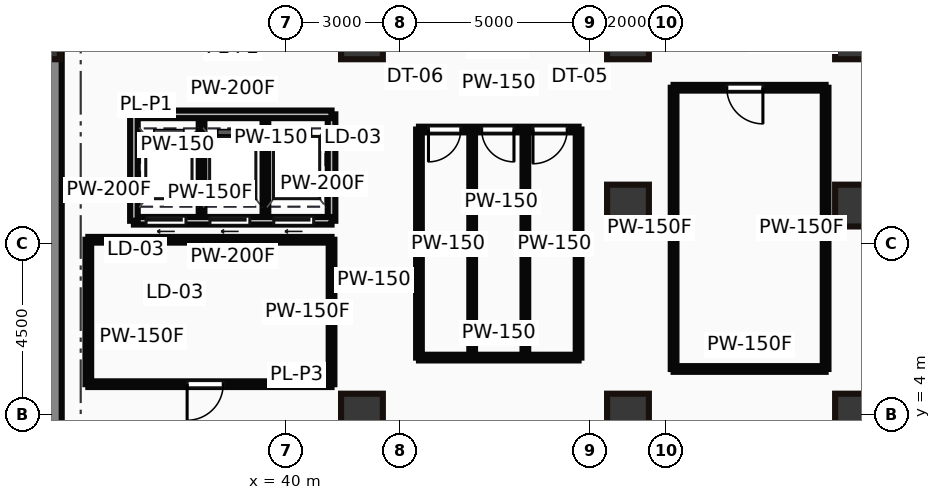
"""IFC4 building model, lengths in metres.
Left out: names, types, materials, properties, quantities, classifications, styles, units other than length and angle.
Written with IfcOpenShell. Run it as: python <this file> out.ifc"""

import sys

from ifc_helpers import new_model, si_unit, direction, frame, frame_2d, origin, origin_2d, place, context, subcontext, project, spatial, rectangle, hollow_rectangle, extrude, source, transform, mapped, element, fill, save


model = new_model("IFC4")
c1 = context("Model", 3, precision=1e-05, world=origin(), true_north=direction((0.0, 1.0)))
c2 = subcontext(c1, "Body", "Model", "MODEL_VIEW")
j1 = project(units=[si_unit("LENGTHUNIT", "METRE"), si_unit("PLANEANGLEUNIT", "RADIAN")], contexts=[c1])
p1 = place(None, origin())
s1 = spatial("IfcSite", under=j1, at=p1, CompositionType="ELEMENT")
p2 = place(p1, origin())
s2 = spatial("IfcBuilding", under=s1, at=p2, CompositionType="ELEMENT")
p3 = place(p2, origin())
s3 = spatial("IfcBuildingStorey", under=s2, at=p3, CompositionType="ELEMENT", Elevation=0.0)
m1 = source(origin(), c2, "Body", "SweptSolid", [
    extrude(rectangle(XDim=13.1, YDim=0.9, at=frame_2d((6.55, 0.0))), origin(), (0.0, 0.0, 1.0), 6.0),
])
p4 = place(p3, frame((33.65, 0.9, 0.0), z_axis=(0.0, 0.0, 1.0), x_axis=(0.0, 1.0, 0.0)))
e1 = element("IfcWall", 1, at=p4, inside=s3, PredefinedType="SHEAR", context=c2, shape_type="MappedRepresentation", body=[
    mapped(m1, transform((0.0, 0.0, 0.0))),
])
m2 = source(origin(), c2, "Body", "SweptSolid", [
    extrude(hollow_rectangle(XDim=1.1, YDim=1.3, WallThickness=0.055, at=origin_2d()), origin(), (0.0, 0.0, 1.0), 6.0),
])
for number, where, z_axis, x_axis in (
    (2, (33.5, 14.0, 0.0), (0.0, 0.0, 1.0), (1.0, 0.0, 0.0)),
    (3, (42.0, 14.0, 0.0), (0.0, 0.0, 1.0), (1.0, 0.0, 0.0)),
    (4, (49.0, 14.0, 0.0), (0.0, 0.0, 1.0), (1.0, 0.0, 0.0)),
    (5, (55.0, 14.0, 0.0), (0.0, 0.0, 1.0), (1.0, 0.0, 0.0)),
):
    element("IfcColumn", number, at=place(p3, frame(where, z_axis=z_axis, x_axis=x_axis)), inside=s3, PredefinedType="PILASTER", context=c2, shape_type="MappedRepresentation", body=[
        mapped(m2, transform((0.0, 0.0, 0.0))),
    ])
m3 = source(origin(), c2, "Body", "SweptSolid", [
    extrude(hollow_rectangle(XDim=1.1, YDim=1.1, WallThickness=0.05, at=origin_2d()), origin(), (0.0, 0.0, 1.0), 6.0),
])
for number, where, z_axis, x_axis in (
    (6, (49.0, 9.5, 0.0), (0.0, 0.0, 1.0), (1.0, 0.0, 0.0)),
    (7, (55.0, 9.5, 0.0), (0.0, 0.0, 1.0), (1.0, 0.0, 0.0)),
    (8, (42.0, 4.0, 0.0), (0.0, 0.0, 1.0), (1.0, 0.0, 0.0)),
    (9, (49.0, 4.0, 0.0), (0.0, 0.0, 1.0), (1.0, 0.0, 0.0)),
    (10, (55.0, 4.0, 0.0), (0.0, 0.0, 1.0), (1.0, 0.0, 0.0)),
):
    element("IfcColumn", number, at=place(p3, frame(where, z_axis=z_axis, x_axis=x_axis)), inside=s3, PredefinedType="PILASTER", context=c2, shape_type="MappedRepresentation", body=[
        mapped(m3, transform((0.0, 0.0, 0.0))),
    ])
m4 = source(origin(), c2, "Body", "SweptSolid", [
    extrude(rectangle(XDim=5.2, YDim=0.2, at=frame_2d((2.6, 0.0))), origin(), (0.0, 0.0, 1.0), 5.7),
])
p5 = place(p3, frame((36.0, 9.1, 0.0), z_axis=(0.0, 0.0, 1.0), x_axis=(1.0, 0.0, 0.0)))
e11 = element("IfcWall", 11, at=p5, inside=s3, PredefinedType="PARTITIONING", context=c2, shape_type="MappedRepresentation", body=[
    mapped(m4, transform((0.0, 0.0, 0.0))),
])
p6 = place(p5, frame((0.32, 0.0, 0.0)))
e12 = element("IfcOpeningElement", 12, at=p6, cuts=e11, PredefinedType="OPENING", context=c2, shape_type="SweptSolid", body=[
    extrude(rectangle(XDim=1.05, YDim=2.15, at=frame_2d((0.525, 1.075))), frame((0.0, 0.11, 0.0), z_axis=(0.0, -1.0, 0.0), x_axis=(1.0, 0.0, 0.0)), (0.0, 0.0, 1.0), 0.22),
])
p7 = place(p5, frame((2.0, 0.0, 0.0)))
e13 = element("IfcOpeningElement", 13, at=p7, cuts=e11, PredefinedType="OPENING", context=c2, shape_type="SweptSolid", body=[
    extrude(rectangle(XDim=1.05, YDim=2.15, at=frame_2d((0.525, 1.075))), frame((0.0, 0.11, 0.0), z_axis=(0.0, -1.0, 0.0), x_axis=(1.0, 0.0, 0.0)), (0.0, 0.0, 1.0), 0.22),
])
p8 = place(p5, frame((3.68, 0.0, 0.0)))
e14 = element("IfcOpeningElement", 14, at=p8, cuts=e11, PredefinedType="OPENING", context=c2, shape_type="SweptSolid", body=[
    extrude(rectangle(XDim=1.05, YDim=2.15, at=frame_2d((0.525, 1.075))), frame((0.0, 0.11, 0.0), z_axis=(0.0, -1.0, 0.0), x_axis=(1.0, 0.0, 0.0)), (0.0, 0.0, 1.0), 0.22),
])
p9 = place(p3, frame((36.0, 11.9, 0.0), z_axis=(0.0, 0.0, 1.0), x_axis=(1.0, 0.0, 0.0)))
e15 = element("IfcWall", 15, at=p9, inside=s3, PredefinedType="PARTITIONING", context=c2, shape_type="MappedRepresentation", body=[
    mapped(m4, transform((0.0, 0.0, 0.0))),
])
m5 = source(origin(), c2, "Body", "SweptSolid", [
    extrude(rectangle(XDim=2.8, YDim=0.2, at=frame_2d((1.4, 0.0))), origin(), (0.0, 0.0, 1.0), 5.7),
])
for number, where, z_axis, x_axis in (
    (16, (36.0, 9.1, 0.0), (0.0, 0.0, 1.0), (0.0, 1.0, 0.0)),
    (17, (41.2, 9.1, 0.0), (0.0, 0.0, 1.0), (0.0, 1.0, 0.0)),
):
    element("IfcWall", number, at=place(p3, frame(where, z_axis=z_axis, x_axis=x_axis)), inside=s3, PredefinedType="PARTITIONING", context=c2, shape_type="MappedRepresentation", body=[
        mapped(m5, transform((0.0, 0.0, 0.0))),
    ])
m6 = source(origin(), c2, "Body", "SweptSolid", [
    extrude(rectangle(XDim=2.7, YDim=0.15, at=frame_2d((1.35, 0.0))), origin(), (0.0, 0.0, 1.0), 5.7),
])
for number, where, z_axis, x_axis in (
    (18, (37.78, 9.15, 0.0), (0.0, 0.0, 1.0), (0.0, 1.0, 0.0)),
    (19, (39.46, 9.15, 0.0), (0.0, 0.0, 1.0), (0.0, 1.0, 0.0)),
):
    element("IfcWall", number, at=place(p3, frame(where, z_axis=z_axis, x_axis=x_axis)), inside=s3, PredefinedType="PARTITIONING", context=c2, shape_type="MappedRepresentation", body=[
        mapped(m6, transform((0.0, 0.0, 0.0))),
    ])
m7 = source(origin(), c2, "Body", "SweptSolid", [
    extrude(rectangle(XDim=4.2, YDim=0.15, at=frame_2d((2.1, 0.0))), origin(), (0.0, 0.0, 1.0), 5.7),
])
p10 = place(p3, frame((43.5, 11.5, 0.0), z_axis=(0.0, 0.0, 1.0), x_axis=(1.0, 0.0, 0.0)))
e20 = element("IfcWall", 20, at=p10, inside=s3, PredefinedType="PARTITIONING", context=c2, shape_type="MappedRepresentation", body=[
    mapped(m7, transform((0.0, 0.0, 0.0))),
])
p11 = place(p10, frame((0.25, 0.0, 0.0)))
e21 = element("IfcOpeningElement", 21, at=p11, cuts=e20, PredefinedType="OPENING", context=c2, shape_type="SweptSolid", body=[
    extrude(rectangle(XDim=0.85, YDim=2.1, at=frame_2d((0.425, 1.05))), frame((0.0, 0.085, 0.0), z_axis=(0.0, -1.0, 0.0), x_axis=(1.0, 0.0, 0.0)), (0.0, 0.0, 1.0), 0.17),
])
p12 = place(p10, frame((1.65, 0.0, 0.0)))
e22 = element("IfcOpeningElement", 22, at=p12, cuts=e20, PredefinedType="OPENING", context=c2, shape_type="SweptSolid", body=[
    extrude(rectangle(XDim=0.85, YDim=2.1, at=frame_2d((0.425, 1.05))), frame((0.0, 0.085, 0.0), z_axis=(0.0, -1.0, 0.0), x_axis=(1.0, 0.0, 0.0)), (0.0, 0.0, 1.0), 0.17),
])
p13 = place(p10, frame((3.0, 0.0, 0.0)))
e23 = element("IfcOpeningElement", 23, at=p13, cuts=e20, PredefinedType="OPENING", context=c2, shape_type="SweptSolid", body=[
    extrude(rectangle(XDim=0.9, YDim=2.1, at=frame_2d((0.45, 1.05))), frame((0.0, 0.085, 0.0), z_axis=(0.0, -1.0, 0.0), x_axis=(1.0, 0.0, 0.0)), (0.0, 0.0, 1.0), 0.17),
])
p14 = place(p3, frame((43.5, 5.5, 0.0), z_axis=(0.0, 0.0, 1.0), x_axis=(1.0, 0.0, 0.0)))
e24 = element("IfcWall", 24, at=p14, inside=s3, PredefinedType="PARTITIONING", context=c2, shape_type="MappedRepresentation", body=[
    mapped(m7, transform((0.0, 0.0, 0.0))),
])
m8 = source(origin(), c2, "Body", "SweptSolid", [
    extrude(rectangle(XDim=6.0, YDim=0.15, at=frame_2d((3.0, 0.0))), origin(), (0.0, 0.0, 1.0), 5.7),
])
for number, where, z_axis, x_axis in (
    (25, (43.5, 5.5, 0.0), (0.0, 0.0, 1.0), (0.0, 1.0, 0.0)),
    (26, (47.7, 5.5, 0.0), (0.0, 0.0, 1.0), (0.0, 1.0, 0.0)),
    (27, (44.9, 5.5, 0.0), (0.0, 0.0, 1.0), (0.0, 1.0, 0.0)),
    (28, (46.3, 5.5, 0.0), (0.0, 0.0, 1.0), (0.0, 1.0, 0.0)),
):
    element("IfcWall", number, at=place(p3, frame(where, z_axis=z_axis, x_axis=x_axis)), inside=s3, PredefinedType="PARTITIONING", context=c2, shape_type="MappedRepresentation", body=[
        mapped(m8, transform((0.0, 0.0, 0.0))),
    ])
m9 = source(origin(), c2, "Body", "SweptSolid", [
    extrude(rectangle(XDim=6.4, YDim=0.15, at=frame_2d((3.2, 0.0))), origin(), (0.0, 0.0, 1.0), 5.7),
])
p15 = place(p3, frame((34.8, 4.8, 0.0), z_axis=(0.0, 0.0, 1.0), x_axis=(1.0, 0.0, 0.0)))
e29 = element("IfcWall", 29, at=p15, inside=s3, PredefinedType="PARTITIONING", context=c2, shape_type="MappedRepresentation", body=[
    mapped(m9, transform((0.0, 0.0, 0.0))),
])
p16 = place(p15, frame((2.6, 0.0, 0.0)))
e30 = element("IfcOpeningElement", 30, at=p16, cuts=e29, PredefinedType="OPENING", context=c2, shape_type="SweptSolid", body=[
    extrude(rectangle(XDim=0.95, YDim=2.15, at=frame_2d((0.475, 1.075))), frame((0.0, 0.085, 0.0), z_axis=(0.0, -1.0, 0.0), x_axis=(1.0, 0.0, 0.0)), (0.0, 0.0, 1.0), 0.17),
])
p17 = place(p3, frame((34.8, 8.6, 0.0), z_axis=(0.0, 0.0, 1.0), x_axis=(1.0, 0.0, 0.0)))
e31 = element("IfcWall", 31, at=p17, inside=s3, PredefinedType="PARTITIONING", context=c2, shape_type="MappedRepresentation", body=[
    mapped(m9, transform((0.0, 0.0, 0.0))),
])
m10 = source(origin(), c2, "Body", "SweptSolid", [
    extrude(rectangle(XDim=3.8, YDim=0.15, at=frame_2d((1.9, 0.0))), origin(), (0.0, 0.0, 1.0), 5.7),
])
for number, where, z_axis, x_axis in (
    (32, (34.8, 4.8, 0.0), (0.0, 0.0, 1.0), (0.0, 1.0, 0.0)),
    (33, (41.2, 4.8, 0.0), (0.0, 0.0, 1.0), (0.0, 1.0, 0.0)),
):
    element("IfcWall", number, at=place(p3, frame(where, z_axis=z_axis, x_axis=x_axis)), inside=s3, PredefinedType="PARTITIONING", context=c2, shape_type="MappedRepresentation", body=[
        mapped(m10, transform((0.0, 0.0, 0.0))),
    ])
m11 = source(origin(), c2, "Body", "SweptSolid", [
    extrude(rectangle(XDim=4.0, YDim=0.15, at=frame_2d((2.0, 0.0))), origin(), (0.0, 0.0, 1.0), 5.7),
])
p18 = place(p3, frame((50.2, 12.6, 0.0), z_axis=(0.0, 0.0, 1.0), x_axis=(1.0, 0.0, 0.0)))
e34 = element("IfcWall", 34, at=p18, inside=s3, PredefinedType="PARTITIONING", context=c2, shape_type="MappedRepresentation", body=[
    mapped(m11, transform((0.0, 0.0, 0.0))),
])
p19 = place(p18, frame((1.4, 0.0, 0.0)))
e35 = element("IfcOpeningElement", 35, at=p19, cuts=e34, PredefinedType="OPENING", context=c2, shape_type="SweptSolid", body=[
    extrude(rectangle(XDim=0.95, YDim=2.15, at=frame_2d((0.475, 1.075))), frame((0.0, 0.085, 0.0), z_axis=(0.0, -1.0, 0.0), x_axis=(1.0, 0.0, 0.0)), (0.0, 0.0, 1.0), 0.17),
])
p20 = place(p3, frame((50.2, 5.2, 0.0), z_axis=(0.0, 0.0, 1.0), x_axis=(1.0, 0.0, 0.0)))
e36 = element("IfcWall", 36, at=p20, inside=s3, PredefinedType="PARTITIONING", context=c2, shape_type="MappedRepresentation", body=[
    mapped(m11, transform((0.0, 0.0, 0.0))),
])
m12 = source(origin(), c2, "Body", "SweptSolid", [
    extrude(rectangle(XDim=7.4, YDim=0.15, at=frame_2d((3.7, 0.0))), origin(), (0.0, 0.0, 1.0), 5.7),
])
for number, where, z_axis, x_axis in (
    (37, (50.2, 5.2, 0.0), (0.0, 0.0, 1.0), (0.0, 1.0, 0.0)),
    (38, (54.2, 5.2, 0.0), (0.0, 0.0, 1.0), (0.0, 1.0, 0.0)),
):
    element("IfcWall", number, at=place(p3, frame(where, z_axis=z_axis, x_axis=x_axis)), inside=s3, PredefinedType="PARTITIONING", context=c2, shape_type="MappedRepresentation", body=[
        mapped(m12, transform((0.0, 0.0, 0.0))),
    ])
m13 = source(origin(), c2, "Body", "SweptSolid", [
    extrude(rectangle(XDim=1.05, YDim=2.15, at=frame_2d((0.525, 1.075))), frame((0.0, 0.025, 0.0), z_axis=(0.0, -1.0, 0.0), x_axis=(1.0, 0.0, 0.0)), (0.0, 0.0, 1.0), 0.05),
])
p21 = place(p6, frame((1.05, 0.0, 0.0), z_axis=(0.0, 0.0, 1.0), x_axis=(-1.0, 0.0, 0.0)))
e39 = element("IfcDoor", 39, at=p21, inside=s3, OperationType="SLIDING_TO_LEFT", PredefinedType="DOOR", context=c2, shape_type="MappedRepresentation", body=[
    mapped(m13, transform((0.0, 0.0, 0.0))),
])
fill(e12, e39)
p22 = place(p7, frame((1.05, 0.0, 0.0), z_axis=(0.0, 0.0, 1.0), x_axis=(-1.0, 0.0, 0.0)))
e40 = element("IfcDoor", 40, at=p22, inside=s3, OperationType="SLIDING_TO_LEFT", PredefinedType="DOOR", context=c2, shape_type="MappedRepresentation", body=[
    mapped(m13, transform((0.0, 0.0, 0.0))),
])
fill(e13, e40)
p23 = place(p8, frame((1.05, 0.0, 0.0), z_axis=(0.0, 0.0, 1.0), x_axis=(-1.0, 0.0, 0.0)))
e41 = element("IfcDoor", 41, at=p23, inside=s3, OperationType="SLIDING_TO_LEFT", PredefinedType="DOOR", context=c2, shape_type="MappedRepresentation", body=[
    mapped(m13, transform((0.0, 0.0, 0.0))),
])
fill(e14, e41)
m14 = source(origin(), c2, "Body", "SweptSolid", [
    extrude(rectangle(XDim=0.85, YDim=2.1, at=frame_2d((0.425, 1.05))), frame((0.0, 0.025, 0.0), z_axis=(0.0, -1.0, 0.0), x_axis=(1.0, 0.0, 0.0)), (0.0, 0.0, 1.0), 0.05),
])
p24 = place(p11, frame((0.85, 0.0, 0.0), z_axis=(0.0, 0.0, 1.0), x_axis=(-1.0, 0.0, 0.0)))
e42 = element("IfcDoor", 42, at=p24, inside=s3, OperationType="SINGLE_SWING_LEFT", PredefinedType="DOOR", context=c2, shape_type="MappedRepresentation", body=[
    mapped(m14, transform((0.0, 0.0, 0.0))),
])
fill(e21, e42)
p25 = place(p12, frame((0.85, 0.0, 0.0), z_axis=(0.0, 0.0, 1.0), x_axis=(-1.0, 0.0, 0.0)))
e43 = element("IfcDoor", 43, at=p25, inside=s3, OperationType="SINGLE_SWING_RIGHT", PredefinedType="DOOR", context=c2, shape_type="MappedRepresentation", body=[
    mapped(m14, transform((0.0, 0.0, 0.0))),
])
fill(e22, e43)
m15 = source(origin(), c2, "Body", "SweptSolid", [
    extrude(rectangle(XDim=0.9, YDim=2.1, at=frame_2d((0.45, 1.05))), frame((0.0, 0.025, 0.0), z_axis=(0.0, -1.0, 0.0), x_axis=(1.0, 0.0, 0.0)), (0.0, 0.0, 1.0), 0.05),
])
p26 = place(p13, frame((0.9, 0.0, 0.0), z_axis=(0.0, 0.0, 1.0), x_axis=(-1.0, 0.0, 0.0)))
e44 = element("IfcDoor", 44, at=p26, inside=s3, OperationType="SINGLE_SWING_LEFT", PredefinedType="DOOR", context=c2, shape_type="MappedRepresentation", body=[
    mapped(m15, transform((0.0, 0.0, 0.0))),
])
fill(e23, e44)
m16 = source(origin(), c2, "Body", "SweptSolid", [
    extrude(rectangle(XDim=0.95, YDim=2.15, at=frame_2d((0.475, 1.075))), frame((0.0, 0.025, 0.0), z_axis=(0.0, -1.0, 0.0), x_axis=(1.0, 0.0, 0.0)), (0.0, 0.0, 1.0), 0.05),
])
p27 = place(p16, frame((0.95, 0.0, 0.0), z_axis=(0.0, 0.0, 1.0), x_axis=(-1.0, 0.0, 0.0)))
e45 = element("IfcDoor", 45, at=p27, inside=s3, OperationType="SINGLE_SWING_LEFT", PredefinedType="DOOR", context=c2, shape_type="MappedRepresentation", body=[
    mapped(m16, transform((0.0, 0.0, 0.0))),
])
fill(e30, e45)
p28 = place(p19, frame((0.95, 0.0, 0.0), z_axis=(0.0, 0.0, 1.0), x_axis=(-1.0, 0.0, 0.0)))
e46 = element("IfcDoor", 46, at=p28, inside=s3, OperationType="SINGLE_SWING_RIGHT", PredefinedType="DOOR", context=c2, shape_type="MappedRepresentation", body=[
    mapped(m16, transform((0.0, 0.0, 0.0))),
])
fill(e35, e46)
save(model, sys.argv[1])
